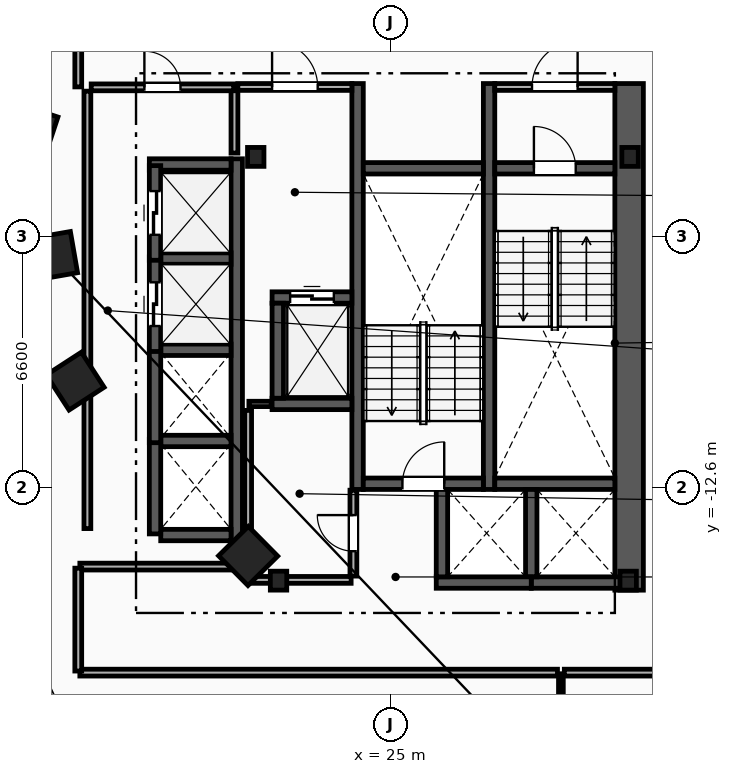
"""IFC4 building model, lengths in metres.
Left out: names, types, materials, properties, quantities, classifications, styles, units other than length and angle.
Written with IfcOpenShell. Run it as: python <this file> out.ifc"""

import sys

from ifc_helpers import new_model, si_unit, direction, frame, frame_2d, origin, origin_2d, place, context, subcontext, project, spatial, rectangle, i_section, extrude, element, fill, save


model = new_model("IFC4")
c1 = context("Model", 3, precision=1e-05, world=origin(), true_north=direction((0.0, 1.0)))
c2 = subcontext(c1, "Body", "Model", "MODEL_VIEW")
j1 = project(units=[si_unit("LENGTHUNIT", "METRE"), si_unit("PLANEANGLEUNIT", "RADIAN")], contexts=[c1])
p1 = place(None, origin())
s1 = spatial("IfcSite", under=j1, at=p1, CompositionType="ELEMENT")
p2 = place(p1, origin())
s2 = spatial("IfcBuilding", under=s1, at=p2, CompositionType="ELEMENT")
p3 = place(p2, frame((0.0, 0.0, 92.6)))
s3 = spatial("IfcBuildingStorey", under=s2, at=p3, CompositionType="ELEMENT", Elevation=92.6)
for number, where, z_axis, x_axis in (
    (1, (31.3, -3.9, 0.0), (0.0, 0.0, 1.0), (1.0, 0.0, 0.0)),
    (2, (21.45, -3.9, 0.0), (0.0, 0.0, 1.0), (1.0, 0.0, 0.0)),
    (3, (22.05, -15.05, 0.0), (0.0, 0.0, 1.0), (1.0, 0.0, 0.0)),
    (4, (31.25, -15.05, 0.0), (0.0, 0.0, 1.0), (1.0, 0.0, 0.0)),
):
    element("IfcColumn", number, at=place(p3, frame(where, z_axis=z_axis, x_axis=x_axis)), inside=s3, PredefinedType="COLUMN", context=c2, shape_type="SweptSolid", body=[
        extrude(i_section(OverallWidth=0.432, OverallDepth=0.498, WebThickness=0.056, FlangeThickness=0.089, FilletRadius=0.018, at=origin_2d()), origin(), (0.0, 0.0, 1.0), 3.6),
    ])
for number, where, z_axis, x_axis in (
    (5, (15.55, -3.2, 0.0), (0.0, 0.0, 1.0), (-0.315, -0.949, 0.0)),
    (6, (16.125, -6.5, 0.0), (0.0, 0.0, 1.0), (0.172, -0.985, 0.0)),
    (7, (16.7, -9.8, 0.0), (0.0, 0.0, 1.0), (0.544, -0.839, 0.0)),
    (8, (21.25, -14.4, 0.0), (0.0, 0.0, 1.0), (0.703, -0.711, 0.0)),
):
    element("IfcColumn", number, at=place(p3, frame(where, z_axis=z_axis, x_axis=x_axis)), inside=s3, PredefinedType="COLUMN", context=c2, shape_type="SweptSolid", body=[
        extrude(rectangle(XDim=1.1, YDim=1.1, at=origin_2d()), origin(), (0.0, 0.0, 1.0), 3.6),
    ])
p4 = place(p3, frame((31.275, -15.3, 0.0), z_axis=(0.0, 0.0, 1.0), x_axis=(0.0, 1.0, 0.0)))
e9 = element("IfcWall", 9, at=p4, inside=s3, PredefinedType="SHEAR", context=c2, shape_type="SweptSolid", body=[
    extrude(rectangle(XDim=13.33, YDim=0.75, at=frame_2d((6.665, 0.0))), origin(), (0.0, 0.0, 1.0), 3.3),
])
for number, where, z_axis, x_axis in (
    (10, (27.59, -12.65, 0.0), (0.0, 0.0, 1.0), (0.0, 1.0, 0.0)),
    (11, (24.13, -12.65, 0.0), (0.0, 0.0, 1.0), (0.0, 1.0, 0.0)),
):
    element("IfcWall", number, at=place(p3, frame(where, z_axis=z_axis, x_axis=x_axis)), inside=s3, PredefinedType="SHEAR", context=c2, shape_type="SweptSolid", body=[
        extrude(rectangle(XDim=10.68, YDim=0.3, at=frame_2d((5.34, 0.0))), origin(), (0.0, 0.0, 1.0), 3.3),
    ])
p5 = place(p3, frame((27.74, -4.2, 0.0), z_axis=(0.0, 0.0, 1.0), x_axis=(1.0, 0.0, 0.0)))
e12 = element("IfcWall", 12, at=p5, inside=s3, PredefinedType="SHEAR", context=c2, shape_type="SweptSolid", body=[
    extrude(rectangle(XDim=3.16, YDim=0.3, at=frame_2d((1.58, 0.0))), origin(), (0.0, 0.0, 1.0), 3.3),
])
p6 = place(p5, frame((1.03, 0.0, 0.0)))
e13 = element("IfcOpeningElement", 13, at=p6, cuts=e12, PredefinedType="OPENING", context=c2, shape_type="SweptSolid", body=[
    extrude(rectangle(XDim=1.1, YDim=2.15, at=frame_2d((0.55, 1.075))), frame((0.0, 0.16, 0.0), z_axis=(0.0, -1.0, 0.0), x_axis=(1.0, 0.0, 0.0)), (0.0, 0.0, 1.0), 0.32),
])
p7 = place(p3, frame((27.74, -12.5, 0.0), z_axis=(0.0, 0.0, 1.0), x_axis=(1.0, 0.0, 0.0)))
e14 = element("IfcWall", 14, at=p7, inside=s3, PredefinedType="SHEAR", context=c2, shape_type="SweptSolid", body=[
    extrude(rectangle(XDim=3.16, YDim=0.3, at=frame_2d((1.58, 0.0))), origin(), (0.0, 0.0, 1.0), 3.3),
])
p8 = place(p3, frame((24.28, -12.5, 0.0), z_axis=(0.0, 0.0, 1.0), x_axis=(1.0, 0.0, 0.0)))
e15 = element("IfcWall", 15, at=p8, inside=s3, PredefinedType="SHEAR", context=c2, shape_type="SweptSolid", body=[
    extrude(rectangle(XDim=3.16, YDim=0.3, at=frame_2d((1.58, 0.0))), origin(), (0.0, 0.0, 1.0), 3.3),
])
p9 = place(p8, frame((1.03, 0.0, 0.0)))
e16 = element("IfcOpeningElement", 16, at=p9, cuts=e15, PredefinedType="OPENING", context=c2, shape_type="SweptSolid", body=[
    extrude(rectangle(XDim=1.1, YDim=2.15, at=frame_2d((0.55, 1.075))), frame((0.0, 0.16, 0.0), z_axis=(0.0, -1.0, 0.0), x_axis=(1.0, 0.0, 0.0)), (0.0, 0.0, 1.0), 0.32),
])
p10 = place(p3, frame((24.28, -4.2, 0.0), z_axis=(0.0, 0.0, 1.0), x_axis=(1.0, 0.0, 0.0)))
e17 = element("IfcWall", 17, at=p10, inside=s3, PredefinedType="SHEAR", context=c2, shape_type="SweptSolid", body=[
    extrude(rectangle(XDim=3.16, YDim=0.3, at=frame_2d((1.58, 0.0))), origin(), (0.0, 0.0, 1.0), 3.3),
])
p11 = place(p3, frame((20.89, -3.8, 0.0), z_axis=(0.0, 0.0, 1.0), x_axis=(0.0, 1.0, 0.0)))
e18 = element("IfcWall", 18, at=p11, inside=s3, PredefinedType="PARTITIONING", context=c2, shape_type="SweptSolid", body=[
    extrude(rectangle(XDim=1.65, YDim=0.18, at=frame_2d((0.825, 0.0))), origin(), (0.0, 0.0, 1.0), 3.3),
])
p12 = place(p3, frame((20.98, -2.06, 0.0), z_axis=(0.0, 0.0, 1.0), x_axis=(1.0, 0.0, 0.0)))
e19 = element("IfcWall", 19, at=p12, inside=s3, PredefinedType="PARTITIONING", context=c2, shape_type="SweptSolid", body=[
    extrude(rectangle(XDim=3.0, YDim=0.18, at=frame_2d((1.5, 0.0))), origin(), (0.0, 0.0, 1.0), 3.3),
])
p13 = place(p12, frame((0.9, 0.0, 0.0)))
e20 = element("IfcOpeningElement", 20, at=p13, cuts=e19, PredefinedType="OPENING", context=c2, shape_type="SweptSolid", body=[
    extrude(rectangle(XDim=1.2, YDim=2.15, at=frame_2d((0.6, 1.075))), frame((0.0, 0.1, 0.0), z_axis=(0.0, -1.0, 0.0), x_axis=(1.0, 0.0, 0.0)), (0.0, 0.0, 1.0), 0.2),
])
p14 = place(p3, frame((27.74, -2.06, 0.0), z_axis=(0.0, 0.0, 1.0), x_axis=(1.0, 0.0, 0.0)))
e21 = element("IfcWall", 21, at=p14, inside=s3, PredefinedType="PARTITIONING", context=c2, shape_type="SweptSolid", body=[
    extrude(rectangle(XDim=3.16, YDim=0.18, at=frame_2d((1.58, 0.0))), origin(), (0.0, 0.0, 1.0), 3.3),
])
p15 = place(p14, frame((0.98, 0.0, 0.0)))
e22 = element("IfcOpeningElement", 22, at=p15, cuts=e21, PredefinedType="OPENING", context=c2, shape_type="SweptSolid", body=[
    extrude(rectangle(XDim=1.2, YDim=2.15, at=frame_2d((0.6, 1.075))), frame((0.0, 0.1, 0.0), z_axis=(0.0, -1.0, 0.0), x_axis=(1.0, 0.0, 0.0)), (0.0, 0.0, 1.0), 0.2),
])
p16 = place(p3, frame((21.88, -7.6, 0.0), z_axis=(0.0, 0.0, 1.0), x_axis=(1.0, 0.0, 0.0)))
e23 = element("IfcWall", 23, at=p16, inside=s3, PredefinedType="SHEAR", context=c2, shape_type="SweptSolid", body=[
    extrude(rectangle(XDim=2.1, YDim=0.3, at=frame_2d((1.05, 0.0))), origin(), (0.0, 0.0, 1.0), 3.3),
])
p17 = place(p16, frame((0.475, 0.0, 0.0)))
e24 = element("IfcOpeningElement", 24, at=p17, cuts=e23, PredefinedType="OPENING", context=c2, shape_type="SweptSolid", body=[
    extrude(rectangle(XDim=1.15, YDim=2.2, at=frame_2d((0.575, 1.1))), frame((0.0, 0.16, 0.0), z_axis=(0.0, -1.0, 0.0), x_axis=(1.0, 0.0, 0.0)), (0.0, 0.0, 1.0), 0.32),
])
p18 = place(p3, frame((21.88, -10.4, 0.0), z_axis=(0.0, 0.0, 1.0), x_axis=(1.0, 0.0, 0.0)))
e25 = element("IfcWall", 25, at=p18, inside=s3, PredefinedType="SHEAR", context=c2, shape_type="SweptSolid", body=[
    extrude(rectangle(XDim=2.1, YDim=0.3, at=frame_2d((1.05, 0.0))), origin(), (0.0, 0.0, 1.0), 3.3),
])
for number, where, z_axis, x_axis in (
    (26, (22.03, -10.25, 0.0), (0.0, 0.0, 1.0), (0.0, 1.0, 0.0)),
    (27, (28.7, -15.1, 0.0), (0.0, 0.0, 1.0), (1.0, 0.0, 0.0)),
):
    element("IfcWall", number, at=place(p3, frame(where, z_axis=z_axis, x_axis=x_axis)), inside=s3, PredefinedType="SHEAR", context=c2, shape_type="SweptSolid", body=[
        extrude(rectangle(XDim=2.5, YDim=0.3, at=frame_2d((1.25, 0.0))), origin(), (0.0, 0.0, 1.0), 3.3),
    ])
p19 = place(p3, frame((28.7, -14.95, 0.0), z_axis=(0.0, 0.0, 1.0), x_axis=(0.0, 1.0, 0.0)))
e28 = element("IfcWall", 28, at=p19, inside=s3, PredefinedType="SHEAR", context=c2, shape_type="SweptSolid", body=[
    extrude(rectangle(XDim=2.3, YDim=0.3, at=frame_2d((1.15, 0.0))), origin(), (0.0, 0.0, 1.0), 3.3),
])
p20 = place(p3, frame((26.2, -15.1, 0.0), z_axis=(0.0, 0.0, 1.0), x_axis=(1.0, 0.0, 0.0)))
e29 = element("IfcWall", 29, at=p20, inside=s3, PredefinedType="SHEAR", context=c2, shape_type="SweptSolid", body=[
    extrude(rectangle(XDim=2.5, YDim=0.3, at=frame_2d((1.25, 0.0))), origin(), (0.0, 0.0, 1.0), 3.3),
])
p21 = place(p3, frame((26.35, -14.95, 0.0), z_axis=(0.0, 0.0, 1.0), x_axis=(0.0, 1.0, 0.0)))
e30 = element("IfcWall", 30, at=p21, inside=s3, PredefinedType="SHEAR", context=c2, shape_type="SweptSolid", body=[
    extrude(rectangle(XDim=2.3, YDim=0.3, at=frame_2d((1.15, 0.0))), origin(), (0.0, 0.0, 1.0), 3.3),
])
p22 = place(p3, frame((20.95, -14.0, 0.0), z_axis=(0.0, 0.0, 1.0), x_axis=(0.0, 1.0, 0.0)))
e31 = element("IfcWall", 31, at=p22, inside=s3, PredefinedType="SHEAR", context=c2, shape_type="SweptSolid", body=[
    extrude(rectangle(XDim=10.05, YDim=0.3, at=frame_2d((5.025, 0.0))), origin(), (0.0, 0.0, 1.0), 3.3),
])
p23 = place(p3, frame((18.95, -13.85, 0.0), z_axis=(0.0, 0.0, 1.0), x_axis=(1.0, 0.0, 0.0)))
e32 = element("IfcWall", 32, at=p23, inside=s3, PredefinedType="SHEAR", context=c2, shape_type="SweptSolid", body=[
    extrude(rectangle(XDim=1.85, YDim=0.3, at=frame_2d((0.925, 0.0))), origin(), (0.0, 0.0, 1.0), 3.3),
])
p24 = place(p3, frame((18.65, -4.1, 0.0), z_axis=(0.0, 0.0, 1.0), x_axis=(1.0, 0.0, 0.0)))
e33 = element("IfcWall", 33, at=p24, inside=s3, PredefinedType="SHEAR", context=c2, shape_type="SweptSolid", body=[
    extrude(rectangle(XDim=2.15, YDim=0.3, at=frame_2d((1.075, 0.0))), origin(), (0.0, 0.0, 1.0), 3.3),
])
for number, where, z_axis, x_axis in (
    (34, (18.95, -11.375, 0.0), (0.0, 0.0, 1.0), (1.0, 0.0, 0.0)),
    (35, (18.95, -8.975, 0.0), (0.0, 0.0, 1.0), (1.0, 0.0, 0.0)),
    (36, (18.95, -6.575, 0.0), (0.0, 0.0, 1.0), (1.0, 0.0, 0.0)),
):
    element("IfcWall", number, at=place(p3, frame(where, z_axis=z_axis, x_axis=x_axis)), inside=s3, PredefinedType="SHEAR", context=c2, shape_type="SweptSolid", body=[
        extrude(rectangle(XDim=1.85, YDim=0.3, at=frame_2d((0.925, 0.0))), origin(), (0.0, 0.0, 1.0), 3.3),
    ])
for number, where, z_axis, x_axis in (
    (37, (18.8, -13.82, 0.0), (0.0, 0.0, 1.0), (0.0, 1.0, 0.0)),
    (38, (18.8, -11.42, 0.0), (0.0, 0.0, 1.0), (0.0, 1.0, 0.0)),
):
    element("IfcWall", number, at=place(p3, frame(where, z_axis=z_axis, x_axis=x_axis)), inside=s3, PredefinedType="SHEAR", context=c2, shape_type="SweptSolid", body=[
        extrude(rectangle(XDim=2.49, YDim=0.3, at=frame_2d((1.245, 0.0))), origin(), (0.0, 0.0, 1.0), 3.3),
    ])
p25 = place(p3, frame((18.8, -9.02, 0.0), z_axis=(0.0, 0.0, 1.0), x_axis=(0.0, 1.0, 0.0)))
e39 = element("IfcWall", 39, at=p25, inside=s3, PredefinedType="SHEAR", context=c2, shape_type="SweptSolid", body=[
    extrude(rectangle(XDim=2.49, YDim=0.3, at=frame_2d((1.245, 0.0))), origin(), (0.0, 0.0, 1.0), 3.3),
])
p26 = place(p25, frame((0.67, 0.0, 0.0)))
e40 = element("IfcOpeningElement", 40, at=p26, cuts=e39, PredefinedType="OPENING", context=c2, shape_type="SweptSolid", body=[
    extrude(rectangle(XDim=1.15, YDim=2.2, at=frame_2d((0.575, 1.1))), frame((0.0, 0.16, 0.0), z_axis=(0.0, -1.0, 0.0), x_axis=(1.0, 0.0, 0.0)), (0.0, 0.0, 1.0), 0.32),
])
p27 = place(p3, frame((18.8, -6.62, 0.0), z_axis=(0.0, 0.0, 1.0), x_axis=(0.0, 1.0, 0.0)))
e41 = element("IfcWall", 41, at=p27, inside=s3, PredefinedType="SHEAR", context=c2, shape_type="SweptSolid", body=[
    extrude(rectangle(XDim=2.49, YDim=0.3, at=frame_2d((1.245, 0.0))), origin(), (0.0, 0.0, 1.0), 3.3),
])
p28 = place(p27, frame((0.67, 0.0, 0.0)))
e42 = element("IfcOpeningElement", 42, at=p28, cuts=e41, PredefinedType="OPENING", context=c2, shape_type="SweptSolid", body=[
    extrude(rectangle(XDim=1.15, YDim=2.2, at=frame_2d((0.575, 1.1))), frame((0.0, 0.16, 0.0), z_axis=(0.0, -1.0, 0.0), x_axis=(1.0, 0.0, 0.0)), (0.0, 0.0, 1.0), 0.32),
])
p29 = place(p3, frame((17.02, -13.68, 0.0), z_axis=(0.0, 0.0, 1.0), x_axis=(0.0, 1.0, 0.0)))
e43 = element("IfcWall", 43, at=p29, inside=s3, PredefinedType="PARTITIONING", context=c2, shape_type="SweptSolid", body=[
    extrude(rectangle(XDim=11.51, YDim=0.18, at=frame_2d((5.755, 0.0))), origin(), (0.0, 0.0, 1.0), 3.3),
])
p30 = place(p3, frame((17.12, -2.07, 0.0), z_axis=(0.0, 0.0, 1.0), x_axis=(1.0, 0.0, 0.0)))
e44 = element("IfcWall", 44, at=p30, inside=s3, PredefinedType="PARTITIONING", context=c2, shape_type="SweptSolid", body=[
    extrude(rectangle(XDim=3.75, YDim=0.18, at=frame_2d((1.875, 0.0))), origin(), (0.0, 0.0, 1.0), 3.3),
])
p31 = place(p30, frame((1.4, 0.0, 0.0)))
e45 = element("IfcOpeningElement", 45, at=p31, cuts=e44, PredefinedType="OPENING", context=c2, shape_type="SweptSolid", body=[
    extrude(rectangle(XDim=0.95, YDim=2.1, at=frame_2d((0.475, 1.05))), frame((0.0, 0.1, 0.0), z_axis=(0.0, -1.0, 0.0), x_axis=(1.0, 0.0, 0.0)), (0.0, 0.0, 1.0), 0.2),
])
p32 = place(p3, frame((21.27, -10.4, 0.0), z_axis=(0.0, 0.0, 1.0), x_axis=(1.0, 0.0, 0.0)))
e46 = element("IfcWall", 46, at=p32, inside=s3, PredefinedType="PARTITIONING", context=c2, shape_type="SweptSolid", body=[
    extrude(rectangle(XDim=0.59, YDim=0.14, at=frame_2d((0.295, 0.0))), origin(), (0.0, 0.0, 1.0), 3.3),
])
p33 = place(p3, frame((21.25, -14.93, 0.0), z_axis=(0.0, 0.0, 1.0), x_axis=(0.0, 1.0, 0.0)))
e47 = element("IfcWall", 47, at=p33, inside=s3, PredefinedType="PARTITIONING", context=c2, shape_type="SweptSolid", body=[
    extrude(rectangle(XDim=4.36, YDim=0.18, at=frame_2d((2.18, 0.0))), origin(), (0.0, 0.0, 1.0), 3.3),
])
p34 = place(p3, frame((21.35, -15.03, 0.0), z_axis=(0.0, 0.0, 1.0), x_axis=(1.0, 0.0, 0.0)))
e48 = element("IfcWall", 48, at=p34, inside=s3, PredefinedType="PARTITIONING", context=c2, shape_type="SweptSolid", body=[
    extrude(rectangle(XDim=2.61, YDim=0.18, at=frame_2d((1.305, 0.0))), origin(), (0.0, 0.0, 1.0), 2.373),
])
p35 = place(p3, frame((24.02, -14.93, 0.0), z_axis=(0.0, 0.0, 1.0), x_axis=(0.0, 1.0, 0.0)))
e49 = element("IfcWall", 49, at=p35, inside=s3, PredefinedType="PARTITIONING", context=c2, shape_type="SweptSolid", body=[
    extrude(rectangle(XDim=2.26, YDim=0.18, at=frame_2d((1.13, 0.0))), origin(), (0.0, 0.0, 1.0), 3.3),
])
p36 = place(p35, frame((0.655, 0.0, 0.0)))
e50 = element("IfcOpeningElement", 50, at=p36, cuts=e49, PredefinedType="OPENING", context=c2, shape_type="SweptSolid", body=[
    extrude(rectangle(XDim=0.95, YDim=2.1, at=frame_2d((0.475, 1.05))), frame((0.0, 0.1, 0.0), z_axis=(0.0, -1.0, 0.0), x_axis=(1.0, 0.0, 0.0)), (0.0, 0.0, 1.0), 0.2),
])
p37 = place(p3, frame((29.48, -25.985, 0.0), z_axis=(0.0, 0.0, 1.0), x_axis=(0.0, 1.0, 0.0)))
e51 = element("IfcWall", 51, at=p37, inside=s3, PredefinedType="PARTITIONING", context=c2, shape_type="SweptSolid", body=[
    extrude(rectangle(XDim=8.485, YDim=0.125, at=frame_2d((4.243, 0.0))), origin(), (0.0, 0.0, 1.0), 3.3),
])
p38 = place(p3, frame((29.57, -17.47, 0.0), z_axis=(0.0, 0.0, 1.0), x_axis=(1.0, 0.0, 0.0)))
e52 = element("IfcWall", 52, at=p38, inside=s3, PredefinedType="PARTITIONING", context=c2, shape_type="SweptSolid", body=[
    extrude(rectangle(XDim=4.058, YDim=0.18, at=frame_2d((2.029, 0.0))), origin(), (0.0, 0.0, 1.0), 3.3),
])
p39 = place(p3, frame((16.822, -17.47, 0.0), z_axis=(0.0, 0.0, 1.0), x_axis=(1.0, 0.0, 0.0)))
e53 = element("IfcWall", 53, at=p39, inside=s3, PredefinedType="PARTITIONING", context=c2, shape_type="SweptSolid", body=[
    extrude(rectangle(XDim=12.568, YDim=0.18, at=frame_2d((6.284, 0.0))), origin(), (0.0, 0.0, 1.0), 3.3),
])
p40 = place(p3, frame((21.178, -14.68, 0.0), z_axis=(0.0, 0.0, 1.0), x_axis=(-1.0, 0.0, 0.0)))
e54 = element("IfcWall", 54, at=p40, inside=s3, PredefinedType="PARTITIONING", context=c2, shape_type="SweptSolid", body=[
    extrude(rectangle(XDim=4.357, YDim=0.18, at=frame_2d((2.178, 0.0))), origin(), (0.0, 0.0, 1.0), 3.3),
])
p41 = place(p3, frame((16.78, -14.721, 0.0), z_axis=(0.0, 0.0, 1.0), x_axis=(0.0, -1.0, 0.0)))
e55 = element("IfcWall", 55, at=p41, inside=s3, PredefinedType="PARTITIONING", context=c2, shape_type="SweptSolid", body=[
    extrude(rectangle(XDim=2.707, YDim=0.18, at=frame_2d((1.354, 0.0))), origin(), (0.0, 0.0, 1.0), 3.3),
])
p42 = place(p3, frame((16.78, 0.329, 0.0), z_axis=(0.0, 0.0, 1.0), x_axis=(0.0, -1.0, 0.0)))
e56 = element("IfcWall", 56, at=p42, inside=s3, PredefinedType="PARTITIONING", context=c2, shape_type="SweptSolid", body=[
    extrude(rectangle(XDim=2.387, YDim=0.18, at=frame_2d((1.194, 0.0))), origin(), (0.0, 0.0, 1.0), 3.3),
])
p43 = place(p6, origin())
e57 = element("IfcDoor", 57, at=p43, inside=s3, OperationType="SINGLE_SWING_LEFT", PredefinedType="DOOR", context=c2, shape_type="SweptSolid", body=[
    extrude(rectangle(XDim=1.1, YDim=2.15, at=frame_2d((0.55, 1.075))), frame((0.0, 0.025, 0.0), z_axis=(0.0, -1.0, 0.0), x_axis=(1.0, 0.0, 0.0)), (0.0, 0.0, 1.0), 0.05),
])
fill(e13, e57)
p44 = place(p9, origin())
e58 = element("IfcDoor", 58, at=p44, inside=s3, OperationType="SINGLE_SWING_RIGHT", PredefinedType="DOOR", context=c2, shape_type="SweptSolid", body=[
    extrude(rectangle(XDim=1.1, YDim=2.15, at=frame_2d((0.55, 1.075))), frame((0.0, 0.025, 0.0), z_axis=(0.0, -1.0, 0.0), x_axis=(1.0, 0.0, 0.0)), (0.0, 0.0, 1.0), 0.05),
])
fill(e16, e58)
p45 = place(p13, origin())
e59 = element("IfcDoor", 59, at=p45, inside=s3, OperationType="SINGLE_SWING_LEFT", PredefinedType="DOOR", context=c2, shape_type="SweptSolid", body=[
    extrude(rectangle(XDim=1.2, YDim=2.15, at=frame_2d((0.6, 1.075))), frame((0.0, 0.025, 0.0), z_axis=(0.0, -1.0, 0.0), x_axis=(1.0, 0.0, 0.0)), (0.0, 0.0, 1.0), 0.05),
])
fill(e20, e59)
p46 = place(p15, origin())
e60 = element("IfcDoor", 60, at=p46, inside=s3, OperationType="SINGLE_SWING_RIGHT", PredefinedType="DOOR", context=c2, shape_type="SweptSolid", body=[
    extrude(rectangle(XDim=1.2, YDim=2.15, at=frame_2d((0.6, 1.075))), frame((0.0, 0.025, 0.0), z_axis=(0.0, -1.0, 0.0), x_axis=(1.0, 0.0, 0.0)), (0.0, 0.0, 1.0), 0.05),
])
fill(e22, e60)
p47 = place(p17, origin())
e61 = element("IfcDoor", 61, at=p47, inside=s3, OperationType="SLIDING_TO_LEFT", PredefinedType="TRAPDOOR", context=c2, shape_type="SweptSolid", body=[
    extrude(rectangle(XDim=1.15, YDim=2.2, at=frame_2d((0.575, 1.1))), frame((0.0, 0.025, 0.0), z_axis=(0.0, -1.0, 0.0), x_axis=(1.0, 0.0, 0.0)), (0.0, 0.0, 1.0), 0.05),
])
fill(e24, e61)
p48 = place(p26, origin())
e62 = element("IfcDoor", 62, at=p48, inside=s3, OperationType="SLIDING_TO_LEFT", PredefinedType="TRAPDOOR", context=c2, shape_type="SweptSolid", body=[
    extrude(rectangle(XDim=1.15, YDim=2.2, at=frame_2d((0.575, 1.1))), frame((0.0, 0.025, 0.0), z_axis=(0.0, -1.0, 0.0), x_axis=(1.0, 0.0, 0.0)), (0.0, 0.0, 1.0), 0.05),
])
fill(e40, e62)
p49 = place(p28, origin())
e63 = element("IfcDoor", 63, at=p49, inside=s3, OperationType="SLIDING_TO_LEFT", PredefinedType="TRAPDOOR", context=c2, shape_type="SweptSolid", body=[
    extrude(rectangle(XDim=1.15, YDim=2.2, at=frame_2d((0.575, 1.1))), frame((0.0, 0.025, 0.0), z_axis=(0.0, -1.0, 0.0), x_axis=(1.0, 0.0, 0.0)), (0.0, 0.0, 1.0), 0.05),
])
fill(e42, e63)
p50 = place(p31, origin())
e64 = element("IfcDoor", 64, at=p50, inside=s3, OperationType="SINGLE_SWING_LEFT", PredefinedType="DOOR", context=c2, shape_type="SweptSolid", body=[
    extrude(rectangle(XDim=0.95, YDim=2.1, at=frame_2d((0.475, 1.05))), frame((0.0, 0.025, 0.0), z_axis=(0.0, -1.0, 0.0), x_axis=(1.0, 0.0, 0.0)), (0.0, 0.0, 1.0), 0.05),
])
fill(e45, e64)
p51 = place(p36, origin())
e65 = element("IfcDoor", 65, at=p51, inside=s3, OperationType="SINGLE_SWING_RIGHT", PredefinedType="DOOR", context=c2, shape_type="SweptSolid", body=[
    extrude(rectangle(XDim=0.95, YDim=2.1, at=frame_2d((0.475, 1.05))), frame((0.0, 0.025, 0.0), z_axis=(0.0, -1.0, 0.0), x_axis=(1.0, 0.0, 0.0)), (0.0, 0.0, 1.0), 0.05),
])
fill(e50, e65)
save(model, sys.argv[1])
